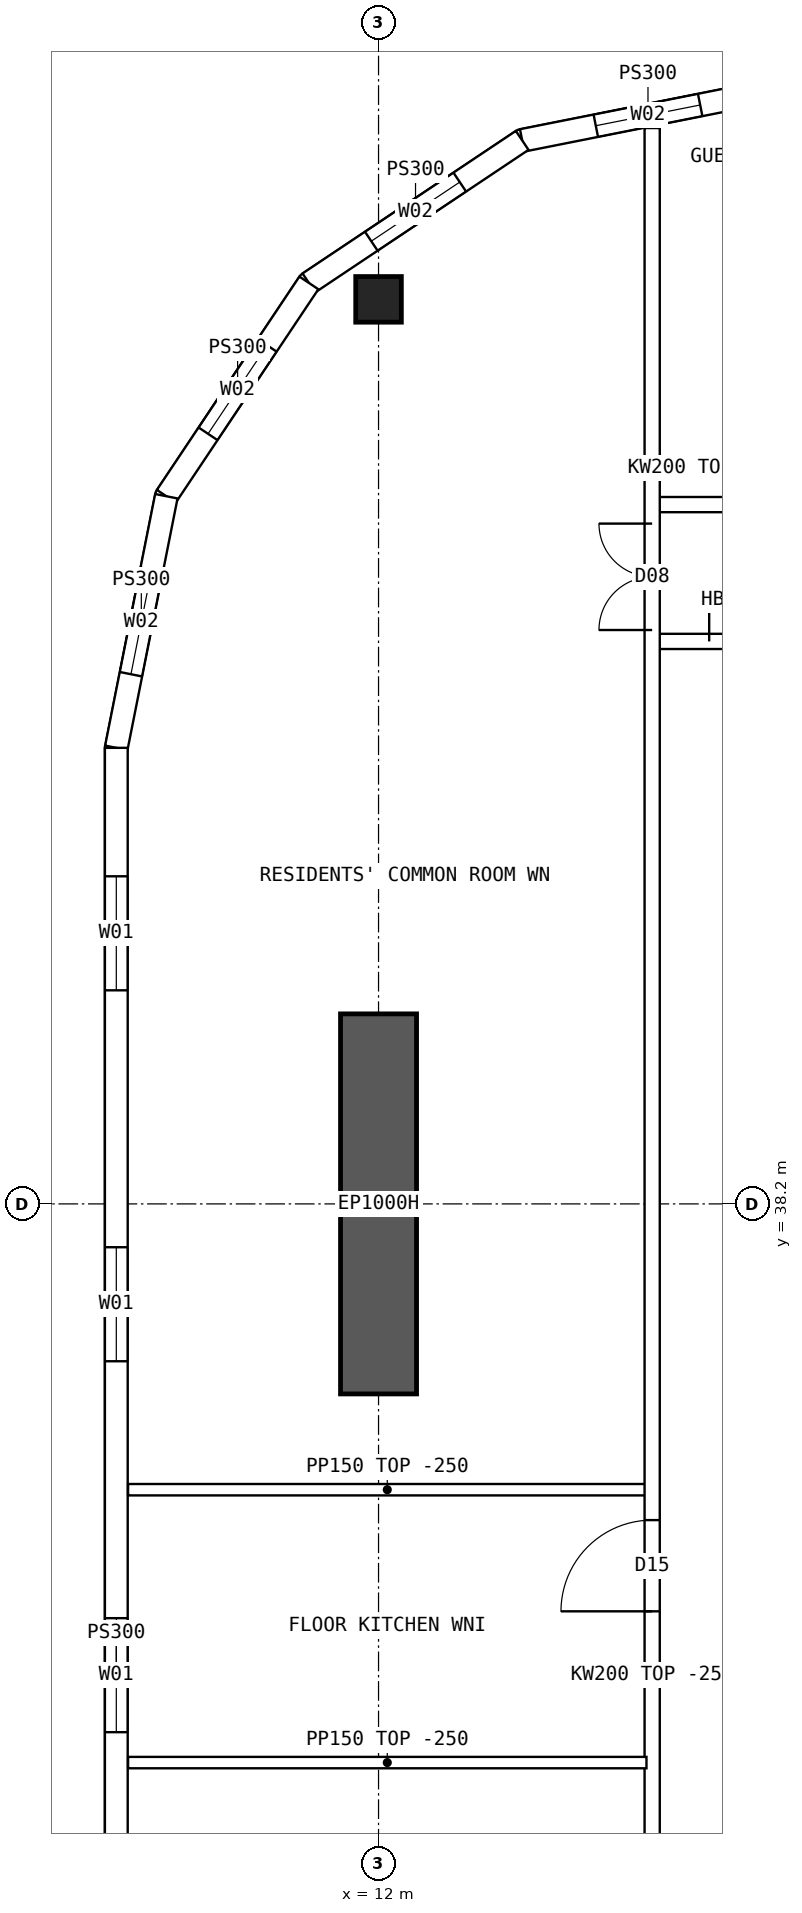
"""IFC4 building model, lengths in metres.
Left out: names, types, materials, properties, quantities, classifications, styles, units other than length and angle.
Written with IfcOpenShell. Run it as: python <this file> out.ifc"""

import sys

from ifc_helpers import new_model, si_unit, direction, frame, frame_2d, origin, origin_2d, place, context, subcontext, project, spatial, polyline, rectangle, hollow_rectangle, outline, extrude, element, fill, save


model = new_model("IFC4")
c1 = context("Model", 3, precision=1e-05, world=origin(), true_north=direction((0.0, 1.0)))
c2 = subcontext(c1, "Body", "Model", "MODEL_VIEW")
j1 = project(units=[si_unit("LENGTHUNIT", "METRE"), si_unit("PLANEANGLEUNIT", "RADIAN")], contexts=[c1])
p1 = place(None, origin())
s1 = spatial("IfcSite", under=j1, at=p1, CompositionType="ELEMENT")
p2 = place(p1, origin())
s2 = spatial("IfcBuilding", under=s1, at=p2, CompositionType="ELEMENT")
p3 = place(p2, frame((0.0, 0.0, 239.05)))
s3 = spatial("IfcBuildingStorey", under=s2, at=p3, CompositionType="ELEMENT", Elevation=239.05)
p4 = place(p3, frame((12.0, 50.1, 0.0), z_axis=(0.0, 0.0, 1.0), x_axis=(1.0, 0.0, 0.0)))
e1 = element("IfcColumn", 1, at=p4, inside=s3, PredefinedType="COLUMN", context=c2, shape_type="SweptSolid", body=[
    extrude(hollow_rectangle(XDim=0.6, YDim=0.6, WallThickness=0.06, at=origin_2d()), origin(), (0.0, 0.0, 1.0), 3.75),
])
p5 = place(p3, frame((12.0, 35.7, 0.0), z_axis=(0.0, 0.0, 1.0), x_axis=(0.0, 1.0, 0.0)))
e2 = element("IfcWall", 2, at=p5, inside=s3, PredefinedType="SHEAR", context=c2, shape_type="SweptSolid", body=[
    extrude(rectangle(XDim=5.0, YDim=1.0, at=frame_2d((2.5, 0.0))), origin(), (0.0, 0.0, 1.0), 3.75),
])
p6 = place(p3, frame((8.55, 44.2, 0.0), z_axis=(0.0, 0.0, 1.0), x_axis=(0.0, -1.0, 0.0)))
e3 = element("IfcWall", 3, at=p6, inside=s3, PredefinedType="SOLIDWALL", context=c2, shape_type="SweptSolid", body=[
    extrude(outline(polyline([(-0.015, -0.15), (24.415, -0.15), (24.385, 0.15), (0.015, 0.15), (-0.015, -0.15)])), origin(), (0.0, 0.0, 1.0), 3.5),
])
p7 = place(p6, frame((1.69, 0.0, 0.9)))
e4 = element("IfcOpeningElement", 4, at=p7, cuts=e3, PredefinedType="OPENING", context=c2, shape_type="SweptSolid", body=[
    extrude(rectangle(XDim=1.5, YDim=2.0, at=frame_2d((0.75, 1.0))), frame((0.0, 0.16, 0.0), z_axis=(0.0, -1.0, 0.0), x_axis=(1.0, 0.0, 0.0)), (0.0, 0.0, 1.0), 0.32),
])
p8 = place(p6, frame((6.57, 0.0, 0.9)))
e5 = element("IfcOpeningElement", 5, at=p8, cuts=e3, PredefinedType="OPENING", context=c2, shape_type="SweptSolid", body=[
    extrude(rectangle(XDim=1.5, YDim=2.0, at=frame_2d((0.75, 1.0))), frame((0.0, 0.16, 0.0), z_axis=(0.0, -1.0, 0.0), x_axis=(1.0, 0.0, 0.0)), (0.0, 0.0, 1.0), 0.32),
])
p9 = place(p6, frame((11.45, 0.0, 0.9)))
e6 = element("IfcOpeningElement", 6, at=p9, cuts=e3, PredefinedType="OPENING", context=c2, shape_type="SweptSolid", body=[
    extrude(rectangle(XDim=1.5, YDim=2.0, at=frame_2d((0.75, 1.0))), frame((0.0, 0.16, 0.0), z_axis=(0.0, -1.0, 0.0), x_axis=(1.0, 0.0, 0.0)), (0.0, 0.0, 1.0), 0.32),
])
p10 = place(p6, frame((16.33, 0.0, 0.9)))
e7 = element("IfcOpeningElement", 7, at=p10, cuts=e3, PredefinedType="OPENING", context=c2, shape_type="SweptSolid", body=[
    extrude(rectangle(XDim=1.5, YDim=2.0, at=frame_2d((0.75, 1.0))), frame((0.0, 0.16, 0.0), z_axis=(0.0, -1.0, 0.0), x_axis=(1.0, 0.0, 0.0)), (0.0, 0.0, 1.0), 0.32),
])
p11 = place(p6, frame((21.21, 0.0, 0.9)))
e8 = element("IfcOpeningElement", 8, at=p11, cuts=e3, PredefinedType="OPENING", context=c2, shape_type="SweptSolid", body=[
    extrude(rectangle(XDim=1.5, YDim=2.0, at=frame_2d((0.75, 1.0))), frame((0.0, 0.16, 0.0), z_axis=(0.0, -1.0, 0.0), x_axis=(1.0, 0.0, 0.0)), (0.0, 0.0, 1.0), 0.32),
])
p12 = place(p3, frame((17.2, 52.85, 0.0), z_axis=(0.0, 0.0, 1.0), x_axis=(-0.98078325777, -0.195100490205, 0.0)))
e9 = element("IfcWall", 9, at=p12, inside=s3, PredefinedType="SOLIDWALL", context=c2, shape_type="SweptSolid", body=[
    extrude(outline(polyline([(-0.03, -0.15), (3.405, -0.15), (3.345, 0.15), (0.03, 0.15), (-0.03, -0.15)])), origin(), (0.0, 0.0, 1.0), 3.5),
])
p13 = place(p12, frame((0.988, 0.0, 0.9)))
e10 = element("IfcOpeningElement", 10, at=p13, cuts=e9, PredefinedType="OPENING", context=c2, shape_type="SweptSolid", body=[
    extrude(rectangle(XDim=1.4, YDim=1.8, at=frame_2d((0.7, 0.9))), frame((0.0, 0.16, 0.0), z_axis=(0.0, -1.0, 0.0), x_axis=(1.0, 0.0, 0.0)), (0.0, 0.0, 1.0), 0.32),
])
p14 = place(p3, frame((13.89, 52.192, 0.0), z_axis=(0.0, 0.0, 1.0), x_axis=(-0.831460037396, -0.555584562613, 0.0)))
e11 = element("IfcWall", 11, at=p14, inside=s3, PredefinedType="SOLIDWALL", context=c2, shape_type="SweptSolid", body=[
    extrude(outline(polyline([(-0.03, -0.15), (3.405, -0.15), (3.345, 0.15), (0.03, 0.15), (-0.03, -0.15)])), origin(), (0.0, 0.0, 1.0), 3.5),
])
p15 = place(p14, frame((0.988, 0.0, 0.9)))
e12 = element("IfcOpeningElement", 12, at=p15, cuts=e11, PredefinedType="OPENING", context=c2, shape_type="SweptSolid", body=[
    extrude(rectangle(XDim=1.4, YDim=1.8, at=frame_2d((0.7, 0.9))), frame((0.0, 0.16, 0.0), z_axis=(0.0, -1.0, 0.0), x_axis=(1.0, 0.0, 0.0)), (0.0, 0.0, 1.0), 0.32),
])
p16 = place(p3, frame((11.083, 50.316, 0.0), z_axis=(0.0, 0.0, 1.0), x_axis=(-0.555567969291, -0.831471124873, 0.0)))
e13 = element("IfcWall", 13, at=p16, inside=s3, PredefinedType="SOLIDWALL", context=c2, shape_type="SweptSolid", body=[
    extrude(outline(polyline([(-0.03, -0.15), (3.405, -0.15), (3.345, 0.15), (0.03, 0.15), (-0.03, -0.15)])), origin(), (0.0, 0.0, 1.0), 3.5),
])
p17 = place(p16, frame((0.988, 0.0, 0.9)))
e14 = element("IfcOpeningElement", 14, at=p17, cuts=e13, PredefinedType="OPENING", context=c2, shape_type="SweptSolid", body=[
    extrude(rectangle(XDim=1.4, YDim=1.8, at=frame_2d((0.7, 0.9))), frame((0.0, 0.16, 0.0), z_axis=(0.0, -1.0, 0.0), x_axis=(1.0, 0.0, 0.0)), (0.0, 0.0, 1.0), 0.32),
])
p18 = place(p3, frame((9.208, 47.51, 0.0), z_axis=(0.0, 0.0, 1.0), x_axis=(-0.19508664885, -0.980786011034, 0.0)))
e15 = element("IfcWall", 15, at=p18, inside=s3, PredefinedType="SOLIDWALL", context=c2, shape_type="SweptSolid", body=[
    extrude(outline(polyline([(-0.03, -0.15), (3.39, -0.15), (3.36, 0.15), (0.03, 0.15), (-0.03, -0.15)])), origin(), (0.0, 0.0, 1.0), 3.5),
])
p19 = place(p18, frame((0.988, 0.0, 0.9)))
e16 = element("IfcOpeningElement", 16, at=p19, cuts=e15, PredefinedType="OPENING", context=c2, shape_type="SweptSolid", body=[
    extrude(rectangle(XDim=1.4, YDim=1.8, at=frame_2d((0.7, 0.9))), frame((0.0, 0.16, 0.0), z_axis=(0.0, -1.0, 0.0), x_axis=(1.0, 0.0, 0.0)), (0.0, 0.0, 1.0), 0.32),
])
p20 = place(p3, frame((15.6, 47.4, 0.0), z_axis=(0.0, 0.0, 1.0), x_axis=(1.0, 0.0, 0.0)))
e17 = element("IfcWall", 17, at=p20, inside=s3, PredefinedType="SOLIDWALL", context=c2, shape_type="SweptSolid", body=[
    extrude(rectangle(XDim=2.05, YDim=0.2, at=frame_2d((1.025, 0.0))), origin(), (0.0, 0.0, 1.0), 3.5),
])
p21 = place(p20, frame((0.95, 0.0, 0.0)))
e18 = element("IfcOpeningElement", 18, at=p21, cuts=e17, PredefinedType="OPENING", context=c2, shape_type="SweptSolid", body=[
    extrude(rectangle(XDim=0.9, YDim=2.1, at=frame_2d((0.45, 1.05))), frame((0.0, 0.11, 0.0), z_axis=(0.0, -1.0, 0.0), x_axis=(1.0, 0.0, 0.0)), (0.0, 0.0, 1.0), 0.22),
])
p22 = place(p3, frame((15.6, 45.6, 0.0), z_axis=(0.0, 0.0, 1.0), x_axis=(1.0, 0.0, 0.0)))
e19 = element("IfcWall", 19, at=p22, inside=s3, PredefinedType="SOLIDWALL", context=c2, shape_type="SweptSolid", body=[
    extrude(rectangle(XDim=2.05, YDim=0.2, at=frame_2d((1.025, 0.0))), origin(), (0.0, 0.0, 1.0), 3.5),
])
p23 = place(p22, frame((0.75, 0.0, 0.0)))
e20 = element("IfcOpeningElement", 20, at=p23, cuts=e19, PredefinedType="OPENING", context=c2, shape_type="SweptSolid", body=[
    extrude(rectangle(XDim=1.2, YDim=2.1, at=frame_2d((0.6, 1.05))), frame((0.0, 0.11, 0.0), z_axis=(0.0, -1.0, 0.0), x_axis=(1.0, 0.0, 0.0)), (0.0, 0.0, 1.0), 0.22),
])
p24 = place(p3, frame((8.705, 30.85, 0.0), z_axis=(0.0, 0.0, 1.0), x_axis=(1.0, 0.0, 0.0)))
e21 = element("IfcWall", 21, at=p24, inside=s3, PredefinedType="PARTITIONING", context=c2, shape_type="SweptSolid", body=[
    extrude(outline(polyline([(0.0, 0.0), (6.82, 0.0), (6.82, 3.5), (3.597, 3.5), (3.595, 3.05), (2.997, 3.05), (2.995, 3.5), (0.0, 3.5), (0.0, 0.0)])), frame((0.0, 0.075, 0.0), z_axis=(0.0, -1.0, 0.0), x_axis=(1.0, 0.0, 0.0)), (0.0, 0.0, 1.0), 0.15),
])
p25 = place(p3, frame((15.6, 11.646, 0.0), z_axis=(0.0, 0.0, 1.0), x_axis=(0.0, 1.0, 0.0)))
e22 = element("IfcWall", 22, at=p25, inside=s3, PredefinedType="SOLIDWALL", context=c2, shape_type="SweptSolid", body=[
    extrude(rectangle(XDim=40.708, YDim=0.2, at=frame_2d((20.354, 0.0))), origin(), (0.0, 0.0, 1.0), 3.5),
])
p26 = place(p25, frame((21.194, 0.0, 0.0)))
e23 = element("IfcOpeningElement", 23, at=p26, cuts=e22, PredefinedType="OPENING", context=c2, shape_type="SweptSolid", body=[
    extrude(rectangle(XDim=1.2, YDim=2.1, at=frame_2d((0.6, 1.05))), frame((0.0, 0.11, 0.0), z_axis=(0.0, -1.0, 0.0), x_axis=(1.0, 0.0, 0.0)), (0.0, 0.0, 1.0), 0.22),
])
p27 = place(p25, frame((5.104, 0.0, 0.0)))
e24 = element("IfcOpeningElement", 24, at=p27, cuts=e22, PredefinedType="OPENING", context=c2, shape_type="SweptSolid", body=[
    extrude(rectangle(XDim=1.4, YDim=2.1, at=frame_2d((0.7, 1.05))), frame((0.0, 0.11, 0.0), z_axis=(0.0, -1.0, 0.0), x_axis=(1.0, 0.0, 0.0)), (0.0, 0.0, 1.0), 0.22),
])
p28 = place(p25, frame((34.104, 0.0, 0.0)))
e25 = element("IfcOpeningElement", 25, at=p28, cuts=e22, PredefinedType="OPENING", context=c2, shape_type="SweptSolid", body=[
    extrude(rectangle(XDim=1.4, YDim=2.1, at=frame_2d((0.7, 1.05))), frame((0.0, 0.11, 0.0), z_axis=(0.0, -1.0, 0.0), x_axis=(1.0, 0.0, 0.0)), (0.0, 0.0, 1.0), 0.22),
])
p29 = place(p3, frame((8.705, 34.44, 0.0), z_axis=(0.0, 0.0, 1.0), x_axis=(1.0, 0.0, 0.0)))
e26 = element("IfcWall", 26, at=p29, inside=s3, PredefinedType="PARTITIONING", context=c2, shape_type="SweptSolid", body=[
    extrude(outline(polyline([(0.0, 0.0), (6.82, 0.0), (6.82, 3.5), (3.597, 3.5), (3.595, 3.05), (2.997, 3.05), (2.995, 3.5), (0.0, 3.5), (0.0, 0.0)])), frame((0.0, 0.075, 0.0), z_axis=(0.0, -1.0, 0.0), x_axis=(1.0, 0.0, 0.0)), (0.0, 0.0, 1.0), 0.15),
])
p30 = place(p7, origin())
e27 = element("IfcWindow", 27, at=p30, inside=s3, PartitioningType="SINGLE_PANEL", PredefinedType="WINDOW", context=c2, shape_type="SweptSolid", body=[
    extrude(rectangle(XDim=1.5, YDim=2.0, at=frame_2d((0.75, 1.0))), frame((0.0, 0.03, 0.0), z_axis=(0.0, -1.0, 0.0), x_axis=(1.0, 0.0, 0.0)), (0.0, 0.0, 1.0), 0.06),
])
fill(e4, e27)
p31 = place(p8, origin())
e28 = element("IfcWindow", 28, at=p31, inside=s3, PartitioningType="SINGLE_PANEL", PredefinedType="WINDOW", context=c2, shape_type="SweptSolid", body=[
    extrude(rectangle(XDim=1.5, YDim=2.0, at=frame_2d((0.75, 1.0))), frame((0.0, 0.03, 0.0), z_axis=(0.0, -1.0, 0.0), x_axis=(1.0, 0.0, 0.0)), (0.0, 0.0, 1.0), 0.06),
])
fill(e5, e28)
p32 = place(p9, origin())
e29 = element("IfcWindow", 29, at=p32, inside=s3, PartitioningType="SINGLE_PANEL", PredefinedType="WINDOW", context=c2, shape_type="SweptSolid", body=[
    extrude(rectangle(XDim=1.5, YDim=2.0, at=frame_2d((0.75, 1.0))), frame((0.0, 0.03, 0.0), z_axis=(0.0, -1.0, 0.0), x_axis=(1.0, 0.0, 0.0)), (0.0, 0.0, 1.0), 0.06),
])
fill(e6, e29)
p33 = place(p13, origin())
e30 = element("IfcWindow", 30, at=p33, inside=s3, PartitioningType="SINGLE_PANEL", PredefinedType="WINDOW", context=c2, shape_type="SweptSolid", body=[
    extrude(rectangle(XDim=1.4, YDim=1.8, at=frame_2d((0.7, 0.9))), frame((0.0, 0.03, 0.0), z_axis=(0.0, -1.0, 0.0), x_axis=(1.0, 0.0, 0.0)), (0.0, 0.0, 1.0), 0.06),
])
fill(e10, e30)
p34 = place(p15, origin())
e31 = element("IfcWindow", 31, at=p34, inside=s3, PartitioningType="SINGLE_PANEL", PredefinedType="WINDOW", context=c2, shape_type="SweptSolid", body=[
    extrude(rectangle(XDim=1.4, YDim=1.8, at=frame_2d((0.7, 0.9))), frame((0.0, 0.03, 0.0), z_axis=(0.0, -1.0, 0.0), x_axis=(1.0, 0.0, 0.0)), (0.0, 0.0, 1.0), 0.06),
])
fill(e12, e31)
p35 = place(p17, origin())
e32 = element("IfcWindow", 32, at=p35, inside=s3, PartitioningType="SINGLE_PANEL", PredefinedType="WINDOW", context=c2, shape_type="SweptSolid", body=[
    extrude(rectangle(XDim=1.4, YDim=1.8, at=frame_2d((0.7, 0.9))), frame((0.0, 0.03, 0.0), z_axis=(0.0, -1.0, 0.0), x_axis=(1.0, 0.0, 0.0)), (0.0, 0.0, 1.0), 0.06),
])
fill(e14, e32)
p36 = place(p19, origin())
e33 = element("IfcWindow", 33, at=p36, inside=s3, PartitioningType="SINGLE_PANEL", PredefinedType="WINDOW", context=c2, shape_type="SweptSolid", body=[
    extrude(rectangle(XDim=1.4, YDim=1.8, at=frame_2d((0.7, 0.9))), frame((0.0, 0.03, 0.0), z_axis=(0.0, -1.0, 0.0), x_axis=(1.0, 0.0, 0.0)), (0.0, 0.0, 1.0), 0.06),
])
fill(e16, e33)
p37 = place(p23, origin())
e34 = element("IfcDoor", 34, at=p37, inside=s3, OperationType="DOUBLE_DOOR_SINGLE_SWING", PredefinedType="DOOR", context=c2, shape_type="SweptSolid", body=[
    extrude(rectangle(XDim=1.2, YDim=2.1, at=frame_2d((0.6, 1.05))), frame((0.0, 0.025, 0.0), z_axis=(0.0, -1.0, 0.0), x_axis=(1.0, 0.0, 0.0)), (0.0, 0.0, 1.0), 0.05),
])
fill(e20, e34)
p38 = place(p26, origin())
e35 = element("IfcDoor", 35, at=p38, inside=s3, OperationType="SINGLE_SWING_LEFT", PredefinedType="DOOR", context=c2, shape_type="SweptSolid", body=[
    extrude(rectangle(XDim=1.2, YDim=2.1, at=frame_2d((0.6, 1.05))), frame((0.0, 0.025, 0.0), z_axis=(0.0, -1.0, 0.0), x_axis=(1.0, 0.0, 0.0)), (0.0, 0.0, 1.0), 0.05),
])
fill(e23, e35)
p39 = place(p28, origin())
e36 = element("IfcDoor", 36, at=p39, inside=s3, OperationType="DOUBLE_DOOR_SINGLE_SWING", PredefinedType="DOOR", context=c2, shape_type="SweptSolid", body=[
    extrude(rectangle(XDim=1.4, YDim=2.1, at=frame_2d((0.7, 1.05))), frame((0.0, 0.025, 0.0), z_axis=(0.0, -1.0, 0.0), x_axis=(1.0, 0.0, 0.0)), (0.0, 0.0, 1.0), 0.05),
])
fill(e25, e36)
save(model, sys.argv[1])
